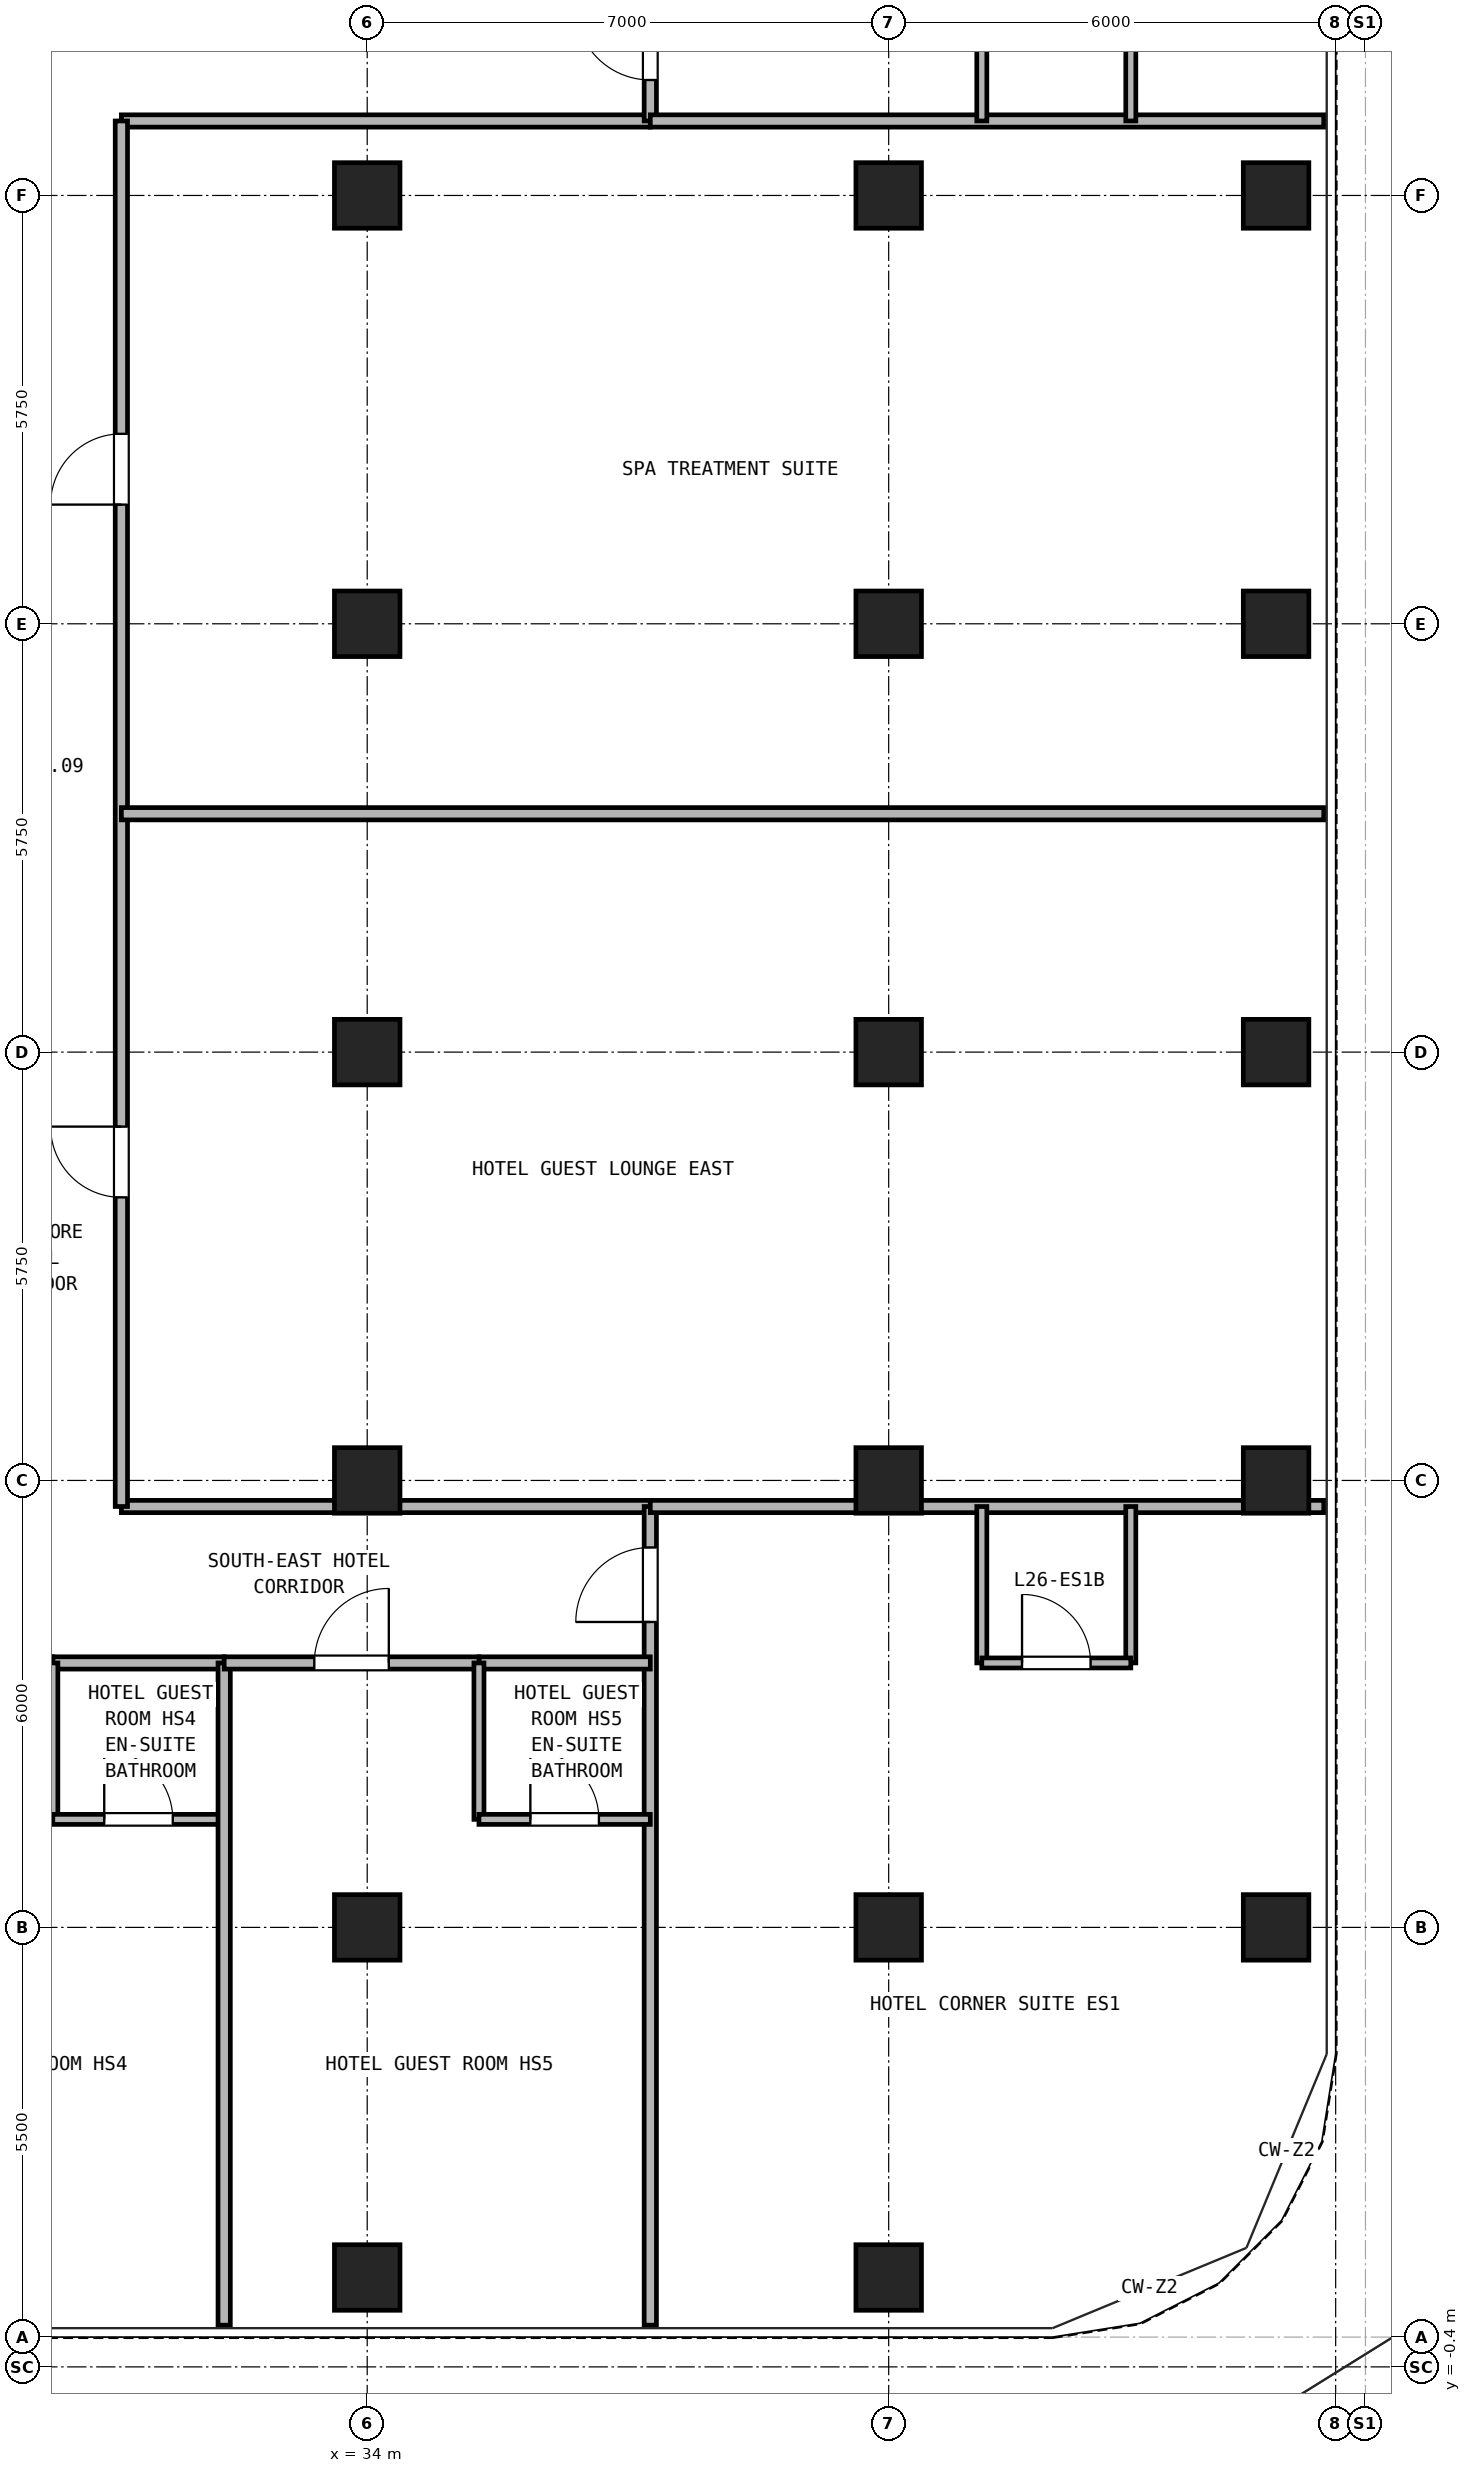
"""IFC4 building model, lengths in metres.
Left out: names, types, materials, properties, quantities, classifications, styles, units other than length and angle.
Written with IfcOpenShell. Run it as: python <this file> out.ifc"""

import sys

from ifc_helpers import new_model, si_unit, direction, frame, frame_2d, origin, origin_2d, place, context, subcontext, project, spatial, rectangle, hollow_rectangle, extrude, source, transform, mapped, element, fill, save


model = new_model("IFC4")
c1 = context("Model", 3, precision=1e-05, world=origin(), true_north=direction((0.0, 1.0)))
c2 = subcontext(c1, "Body", "Model", "MODEL_VIEW")
j1 = project(units=[si_unit("LENGTHUNIT", "METRE"), si_unit("PLANEANGLEUNIT", "RADIAN")], contexts=[c1])
p1 = place(None, origin())
s1 = spatial("IfcSite", under=j1, at=p1, CompositionType="ELEMENT")
p2 = place(p1, origin())
s2 = spatial("IfcBuilding", under=s1, at=p2, CompositionType="ELEMENT")
p3 = place(p2, frame((0.0, 0.0, 99.1)))
s3 = spatial("IfcBuildingStorey", under=s2, at=p3, CompositionType="ELEMENT", Elevation=99.1)
m1 = source(origin(), c2, "Body", "SweptSolid", [
    extrude(hollow_rectangle(XDim=0.88, YDim=0.88, WallThickness=0.05, at=origin_2d()), origin(), (0.0, 0.0, 1.0), 2.95),
])
for number, where, z_axis, x_axis in (
    (1, (34.0, 0.8, 0.0), (0.0, 0.0, 1.0), (1.0, 0.0, 0.0)),
    (2, (41.0, 0.8, 0.0), (0.0, 0.0, 1.0), (1.0, 0.0, 0.0)),
    (3, (46.2, 5.5, 0.0), (0.0, 0.0, 1.0), (1.0, 0.0, 0.0)),
    (4, (46.2, 11.5, 0.0), (0.0, 0.0, 1.0), (1.0, 0.0, 0.0)),
    (5, (46.2, 17.25, 0.0), (0.0, 0.0, 1.0), (1.0, 0.0, 0.0)),
    (6, (46.2, 23.0, 0.0), (0.0, 0.0, 1.0), (1.0, 0.0, 0.0)),
    (7, (46.2, 28.75, 0.0), (0.0, 0.0, 1.0), (1.0, 0.0, 0.0)),
    (8, (34.0, 5.5, 0.0), (0.0, 0.0, 1.0), (1.0, 0.0, 0.0)),
    (9, (34.0, 11.5, 0.0), (0.0, 0.0, 1.0), (1.0, 0.0, 0.0)),
    (10, (34.0, 17.25, 0.0), (0.0, 0.0, 1.0), (1.0, 0.0, 0.0)),
    (11, (34.0, 23.0, 0.0), (0.0, 0.0, 1.0), (1.0, 0.0, 0.0)),
    (12, (34.0, 28.75, 0.0), (0.0, 0.0, 1.0), (1.0, 0.0, 0.0)),
    (13, (41.0, 5.5, 0.0), (0.0, 0.0, 1.0), (1.0, 0.0, 0.0)),
    (14, (41.0, 11.5, 0.0), (0.0, 0.0, 1.0), (1.0, 0.0, 0.0)),
    (15, (41.0, 17.25, 0.0), (0.0, 0.0, 1.0), (1.0, 0.0, 0.0)),
    (16, (41.0, 23.0, 0.0), (0.0, 0.0, 1.0), (1.0, 0.0, 0.0)),
    (17, (41.0, 28.75, 0.0), (0.0, 0.0, 1.0), (1.0, 0.0, 0.0)),
):
    element("IfcColumn", number, at=place(p3, frame(where, z_axis=z_axis, x_axis=x_axis)), inside=s3, PredefinedType="COLUMN", context=c2, shape_type="MappedRepresentation", body=[
        mapped(m1, transform((0.0, 0.0, 0.0), x_axis=(1.0, 0.0, 0.0), y_axis=(0.0, 1.0, 0.0), z_axis=(0.0, 0.0, 1.0), scale=1.0)),
    ])
for number, where, z_axis, x_axis in (
    (18, (30.7, 11.15, 0.0), (0.0, 0.0, 1.0), (1.0, 0.0, 0.0)),
    (19, (30.7, 29.75, 0.0), (0.0, 0.0, 1.0), (1.0, 0.0, 0.0)),
):
    element("IfcWall", number, at=place(p3, frame(where, z_axis=z_axis, x_axis=x_axis)), inside=s3, PredefinedType="PARTITIONING", context=c2, shape_type="SweptSolid", body=[
        extrude(rectangle(XDim=7.1, YDim=0.165, at=frame_2d((3.55, 0.0))), origin(), (0.0, 0.0, 1.0), 2.95),
    ])
p4 = place(p3, frame((30.7, 11.15, 0.0), z_axis=(0.0, 0.0, 1.0), x_axis=(0.0, 1.0, 0.0)))
e20 = element("IfcWall", 20, at=p4, inside=s3, PredefinedType="PARTITIONING", context=c2, shape_type="SweptSolid", body=[
    extrude(rectangle(XDim=18.6, YDim=0.165, at=frame_2d((9.3, 0.0))), origin(), (0.0, 0.0, 1.0), 2.95),
])
p5 = place(p4, frame((4.15, 0.0, 0.0)))
e21 = element("IfcOpeningElement", 21, at=p5, cuts=e20, PredefinedType="OPENING", context=c2, shape_type="SweptSolid", body=[
    extrude(rectangle(XDim=0.95, YDim=2.15, at=frame_2d((0.475, 1.075))), frame((0.0, 0.093, 0.0), z_axis=(0.0, -1.0, 0.0), x_axis=(1.0, 0.0, 0.0)), (0.0, 0.0, 1.0), 0.185),
])
p6 = place(p4, frame((13.45, 0.0, 0.0)))
e22 = element("IfcOpeningElement", 22, at=p6, cuts=e20, PredefinedType="OPENING", context=c2, shape_type="SweptSolid", body=[
    extrude(rectangle(XDim=0.95, YDim=2.15, at=frame_2d((0.475, 1.075))), frame((0.0, 0.093, 0.0), z_axis=(0.0, -1.0, 0.0), x_axis=(1.0, 0.0, 0.0)), (0.0, 0.0, 1.0), 0.185),
])
p7 = place(p3, frame((37.8, 0.16, 0.0), z_axis=(0.0, 0.0, 1.0), x_axis=(0.0, 1.0, 0.0)))
e23 = element("IfcWall", 23, at=p7, inside=s3, PredefinedType="PARTITIONING", context=c2, shape_type="SweptSolid", body=[
    extrude(rectangle(XDim=10.99, YDim=0.165, at=frame_2d((5.495, 0.0))), origin(), (0.0, 0.0, 1.0), 2.95),
])
p8 = place(p7, frame((9.44, 0.0, 0.0)))
e24 = element("IfcOpeningElement", 24, at=p8, cuts=e23, PredefinedType="OPENING", context=c2, shape_type="SweptSolid", body=[
    extrude(rectangle(XDim=1.0, YDim=2.15, at=frame_2d((0.5, 1.075))), frame((0.0, 0.093, 0.0), z_axis=(0.0, -1.0, 0.0), x_axis=(1.0, 0.0, 0.0)), (0.0, 0.0, 1.0), 0.185),
])
p9 = place(p3, frame((37.8, 29.75, 0.0), z_axis=(0.0, 0.0, 1.0), x_axis=(0.0, 1.0, 0.0)))
e25 = element("IfcWall", 25, at=p9, inside=s3, PredefinedType="PARTITIONING", context=c2, shape_type="SweptSolid", body=[
    extrude(rectangle(XDim=5.39, YDim=0.165, at=frame_2d((2.695, 0.0))), origin(), (0.0, 0.0, 1.0), 2.95),
])
p10 = place(p9, frame((0.55, 0.0, 0.0)))
e26 = element("IfcOpeningElement", 26, at=p10, cuts=e25, PredefinedType="OPENING", context=c2, shape_type="SweptSolid", body=[
    extrude(rectangle(XDim=1.0, YDim=2.15, at=frame_2d((0.5, 1.075))), frame((0.0, 0.093, 0.0), z_axis=(0.0, -1.0, 0.0), x_axis=(1.0, 0.0, 0.0)), (0.0, 0.0, 1.0), 0.185),
])
for number, where, z_axis, x_axis in (
    (27, (37.8, 11.15, 0.0), (0.0, 0.0, 1.0), (1.0, 0.0, 0.0)),
    (28, (37.8, 29.75, 0.0), (0.0, 0.0, 1.0), (1.0, 0.0, 0.0)),
):
    element("IfcWall", number, at=place(p3, frame(where, z_axis=z_axis, x_axis=x_axis)), inside=s3, PredefinedType="PARTITIONING", context=c2, shape_type="SweptSolid", body=[
        extrude(rectangle(XDim=9.04, YDim=0.165, at=frame_2d((4.52, 0.0))), origin(), (0.0, 0.0, 1.0), 2.95),
    ])
for number, where, z_axis, x_axis in (
    (29, (42.25, 9.05, 0.0), (0.0, 0.0, 1.0), (0.0, 1.0, 0.0)),
    (30, (44.25, 9.05, 0.0), (0.0, 0.0, 1.0), (0.0, 1.0, 0.0)),
):
    element("IfcWall", number, at=place(p3, frame(where, z_axis=z_axis, x_axis=x_axis)), inside=s3, PredefinedType="PARTITIONING", context=c2, shape_type="SweptSolid", body=[
        extrude(rectangle(XDim=2.1, YDim=0.135, at=frame_2d((1.05, 0.0))), origin(), (0.0, 0.0, 1.0), 2.95),
    ])
p11 = place(p3, frame((42.25, 9.05, 0.0), z_axis=(0.0, 0.0, 1.0), x_axis=(1.0, 0.0, 0.0)))
e31 = element("IfcWall", 31, at=p11, inside=s3, PredefinedType="PARTITIONING", context=c2, shape_type="SweptSolid", body=[
    extrude(rectangle(XDim=2.0, YDim=0.135, at=frame_2d((1.0, 0.0))), origin(), (0.0, 0.0, 1.0), 2.95),
])
p12 = place(p11, frame((0.54, 0.0, 0.0)))
e32 = element("IfcOpeningElement", 32, at=p12, cuts=e31, PredefinedType="OPENING", context=c2, shape_type="SweptSolid", body=[
    extrude(rectangle(XDim=0.92, YDim=2.1, at=frame_2d((0.46, 1.05))), frame((0.0, 0.077, 0.0), z_axis=(0.0, -1.0, 0.0), x_axis=(1.0, 0.0, 0.0)), (0.0, 0.0, 1.0), 0.155),
])
for number, where, z_axis, x_axis in (
    (33, (42.25, 29.75, 0.0), (0.0, 0.0, 1.0), (0.0, 1.0, 0.0)),
    (34, (44.25, 29.75, 0.0), (0.0, 0.0, 1.0), (0.0, 1.0, 0.0)),
):
    element("IfcWall", number, at=place(p3, frame(where, z_axis=z_axis, x_axis=x_axis)), inside=s3, PredefinedType="PARTITIONING", context=c2, shape_type="SweptSolid", body=[
        extrude(rectangle(XDim=2.1, YDim=0.135, at=frame_2d((1.05, 0.0))), origin(), (0.0, 0.0, 1.0), 2.95),
    ])
p13 = place(p3, frame((29.78, 9.05, 0.0), z_axis=(0.0, 0.0, 1.0), x_axis=(1.0, 0.0, 0.0)))
e35 = element("IfcWall", 35, at=p13, inside=s3, PredefinedType="PARTITIONING", context=c2, shape_type="SweptSolid", body=[
    extrude(rectangle(XDim=2.3, YDim=0.165, at=frame_2d((1.15, 0.0))), origin(), (0.0, 0.0, 1.0), 2.95),
])
p14 = place(p3, frame((29.78, 6.95, 0.0), z_axis=(0.0, 0.0, 1.0), x_axis=(0.0, 1.0, 0.0)))
e36 = element("IfcWall", 36, at=p14, inside=s3, PredefinedType="PARTITIONING", context=c2, shape_type="SweptSolid", body=[
    extrude(rectangle(XDim=2.1, YDim=0.135, at=frame_2d((1.05, 0.0))), origin(), (0.0, 0.0, 1.0), 2.95),
])
p15 = place(p3, frame((29.78, 6.95, 0.0), z_axis=(0.0, 0.0, 1.0), x_axis=(1.0, 0.0, 0.0)))
e37 = element("IfcWall", 37, at=p15, inside=s3, PredefinedType="PARTITIONING", context=c2, shape_type="SweptSolid", body=[
    extrude(rectangle(XDim=2.3, YDim=0.135, at=frame_2d((1.15, 0.0))), origin(), (0.0, 0.0, 1.0), 2.95),
])
p16 = place(p15, frame((0.69, 0.0, 0.0)))
e38 = element("IfcOpeningElement", 38, at=p16, cuts=e37, PredefinedType="OPENING", context=c2, shape_type="SweptSolid", body=[
    extrude(rectangle(XDim=0.92, YDim=2.1, at=frame_2d((0.46, 1.05))), frame((0.0, 0.077, 0.0), z_axis=(0.0, -1.0, 0.0), x_axis=(1.0, 0.0, 0.0)), (0.0, 0.0, 1.0), 0.155),
])
p17 = place(p3, frame((32.08, 0.16, 0.0), z_axis=(0.0, 0.0, 1.0), x_axis=(0.0, 1.0, 0.0)))
e39 = element("IfcWall", 39, at=p17, inside=s3, PredefinedType="PARTITIONING", context=c2, shape_type="SweptSolid", body=[
    extrude(rectangle(XDim=8.89, YDim=0.165, at=frame_2d((4.445, 0.0))), origin(), (0.0, 0.0, 1.0), 2.95),
])
p18 = place(p3, frame((35.5, 9.05, 0.0), z_axis=(0.0, 0.0, 1.0), x_axis=(1.0, 0.0, 0.0)))
e40 = element("IfcWall", 40, at=p18, inside=s3, PredefinedType="PARTITIONING", context=c2, shape_type="SweptSolid", body=[
    extrude(rectangle(XDim=2.3, YDim=0.165, at=frame_2d((1.15, 0.0))), origin(), (0.0, 0.0, 1.0), 2.95),
])
p19 = place(p3, frame((32.08, 9.05, 0.0), z_axis=(0.0, 0.0, 1.0), x_axis=(1.0, 0.0, 0.0)))
e41 = element("IfcWall", 41, at=p19, inside=s3, PredefinedType="PARTITIONING", context=c2, shape_type="SweptSolid", body=[
    extrude(rectangle(XDim=3.42, YDim=0.165, at=frame_2d((1.71, 0.0))), origin(), (0.0, 0.0, 1.0), 2.95),
])
p20 = place(p19, frame((1.21, 0.0, 0.0)))
e42 = element("IfcOpeningElement", 42, at=p20, cuts=e41, PredefinedType="OPENING", context=c2, shape_type="SweptSolid", body=[
    extrude(rectangle(XDim=1.0, YDim=2.15, at=frame_2d((0.5, 1.075))), frame((0.0, 0.093, 0.0), z_axis=(0.0, -1.0, 0.0), x_axis=(1.0, 0.0, 0.0)), (0.0, 0.0, 1.0), 0.185),
])
p21 = place(p3, frame((35.5, 6.95, 0.0), z_axis=(0.0, 0.0, 1.0), x_axis=(0.0, 1.0, 0.0)))
e43 = element("IfcWall", 43, at=p21, inside=s3, PredefinedType="PARTITIONING", context=c2, shape_type="SweptSolid", body=[
    extrude(rectangle(XDim=2.1, YDim=0.135, at=frame_2d((1.05, 0.0))), origin(), (0.0, 0.0, 1.0), 2.95),
])
p22 = place(p3, frame((35.5, 6.95, 0.0), z_axis=(0.0, 0.0, 1.0), x_axis=(1.0, 0.0, 0.0)))
e44 = element("IfcWall", 44, at=p22, inside=s3, PredefinedType="PARTITIONING", context=c2, shape_type="SweptSolid", body=[
    extrude(rectangle(XDim=2.3, YDim=0.135, at=frame_2d((1.15, 0.0))), origin(), (0.0, 0.0, 1.0), 2.95),
])
p23 = place(p22, frame((0.69, 0.0, 0.0)))
e45 = element("IfcOpeningElement", 45, at=p23, cuts=e44, PredefinedType="OPENING", context=c2, shape_type="SweptSolid", body=[
    extrude(rectangle(XDim=0.92, YDim=2.1, at=frame_2d((0.46, 1.05))), frame((0.0, 0.077, 0.0), z_axis=(0.0, -1.0, 0.0), x_axis=(1.0, 0.0, 0.0)), (0.0, 0.0, 1.0), 0.155),
])
p24 = place(p3, frame((30.7, 20.45, 0.0), z_axis=(0.0, 0.0, 1.0), x_axis=(1.0, 0.0, 0.0)))
e46 = element("IfcWall", 46, at=p24, inside=s3, PredefinedType="PARTITIONING", context=c2, shape_type="SweptSolid", body=[
    extrude(rectangle(XDim=16.14, YDim=0.165, at=frame_2d((8.07, 0.0))), origin(), (0.0, 0.0, 1.0), 2.95),
])
p25 = place(p12, origin())
e47 = element("IfcDoor", 47, at=p25, inside=s3, OperationType="SINGLE_SWING_LEFT", PredefinedType="DOOR", context=c2, shape_type="SweptSolid", body=[
    extrude(rectangle(XDim=0.92, YDim=2.1, at=frame_2d((0.46, 1.05))), frame((0.0, 0.025, 0.0), z_axis=(0.0, -1.0, 0.0), x_axis=(1.0, 0.0, 0.0)), (0.0, 0.0, 1.0), 0.05),
])
fill(e32, e47)
p26 = place(p8, frame((1.0, 0.0, 0.0), z_axis=(0.0, 0.0, 1.0), x_axis=(-1.0, 0.0, 0.0)))
e48 = element("IfcDoor", 48, at=p26, inside=s3, OperationType="SINGLE_SWING_LEFT", PredefinedType="DOOR", context=c2, shape_type="SweptSolid", body=[
    extrude(rectangle(XDim=1.0, YDim=2.15, at=frame_2d((0.5, 1.075))), frame((0.0, 0.025, 0.0), z_axis=(0.0, -1.0, 0.0), x_axis=(1.0, 0.0, 0.0)), (0.0, 0.0, 1.0), 0.05),
])
fill(e24, e48)
p27 = place(p10, frame((1.0, 0.0, 0.0), z_axis=(0.0, 0.0, 1.0), x_axis=(-1.0, 0.0, 0.0)))
e49 = element("IfcDoor", 49, at=p27, inside=s3, OperationType="SINGLE_SWING_RIGHT", PredefinedType="DOOR", context=c2, shape_type="SweptSolid", body=[
    extrude(rectangle(XDim=1.0, YDim=2.15, at=frame_2d((0.5, 1.075))), frame((0.0, 0.025, 0.0), z_axis=(0.0, -1.0, 0.0), x_axis=(1.0, 0.0, 0.0)), (0.0, 0.0, 1.0), 0.05),
])
fill(e26, e49)
p28 = place(p16, origin())
e50 = element("IfcDoor", 50, at=p28, inside=s3, OperationType="SINGLE_SWING_LEFT", PredefinedType="DOOR", context=c2, shape_type="SweptSolid", body=[
    extrude(rectangle(XDim=0.92, YDim=2.1, at=frame_2d((0.46, 1.05))), frame((0.0, 0.025, 0.0), z_axis=(0.0, -1.0, 0.0), x_axis=(1.0, 0.0, 0.0)), (0.0, 0.0, 1.0), 0.05),
])
fill(e38, e50)
p29 = place(p23, origin())
e51 = element("IfcDoor", 51, at=p29, inside=s3, OperationType="SINGLE_SWING_LEFT", PredefinedType="DOOR", context=c2, shape_type="SweptSolid", body=[
    extrude(rectangle(XDim=0.92, YDim=2.1, at=frame_2d((0.46, 1.05))), frame((0.0, 0.025, 0.0), z_axis=(0.0, -1.0, 0.0), x_axis=(1.0, 0.0, 0.0)), (0.0, 0.0, 1.0), 0.05),
])
fill(e45, e51)
p30 = place(p20, frame((1.0, 0.0, 0.0), z_axis=(0.0, 0.0, 1.0), x_axis=(-1.0, 0.0, 0.0)))
e52 = element("IfcDoor", 52, at=p30, inside=s3, OperationType="SINGLE_SWING_RIGHT", PredefinedType="DOOR", context=c2, shape_type="SweptSolid", body=[
    extrude(rectangle(XDim=1.0, YDim=2.15, at=frame_2d((0.5, 1.075))), frame((0.0, 0.025, 0.0), z_axis=(0.0, -1.0, 0.0), x_axis=(1.0, 0.0, 0.0)), (0.0, 0.0, 1.0), 0.05),
])
fill(e42, e52)
p31 = place(p5, origin())
e53 = element("IfcDoor", 53, at=p31, inside=s3, OperationType="SINGLE_SWING_RIGHT", PredefinedType="DOOR", context=c2, shape_type="SweptSolid", body=[
    extrude(rectangle(XDim=0.95, YDim=2.15, at=frame_2d((0.475, 1.075))), frame((0.0, 0.025, 0.0), z_axis=(0.0, -1.0, 0.0), x_axis=(1.0, 0.0, 0.0)), (0.0, 0.0, 1.0), 0.05),
])
fill(e21, e53)
p32 = place(p6, origin())
e54 = element("IfcDoor", 54, at=p32, inside=s3, OperationType="SINGLE_SWING_LEFT", PredefinedType="DOOR", context=c2, shape_type="SweptSolid", body=[
    extrude(rectangle(XDim=0.95, YDim=2.15, at=frame_2d((0.475, 1.075))), frame((0.0, 0.025, 0.0), z_axis=(0.0, -1.0, 0.0), x_axis=(1.0, 0.0, 0.0)), (0.0, 0.0, 1.0), 0.05),
])
fill(e22, e54)
save(model, sys.argv[1])
